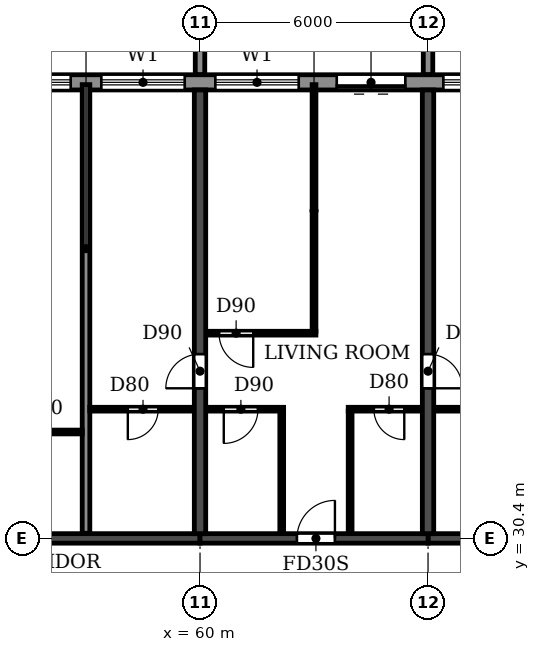
"""IFC4 building model, lengths in metres.
Left out: names, types, materials, properties, quantities, classifications, styles, units other than length and angle.
Written with IfcOpenShell. Run it as: python <this file> out.ifc"""

import sys

from ifc_helpers import new_model, si_unit, direction, frame, frame_2d, origin, place, context, subcontext, project, spatial, polyline, rectangle, outline, extrude, source, transform, mapped, element, fill, save


model = new_model("IFC4")
c1 = context("Model", 3, precision=1e-05, world=origin(), true_north=direction((0.0, 1.0)))
c2 = subcontext(c1, "Body", "Model", "MODEL_VIEW")
j1 = project(units=[si_unit("LENGTHUNIT", "METRE"), si_unit("PLANEANGLEUNIT", "RADIAN")], contexts=[c1])
p1 = place(None, origin())
s1 = spatial("IfcSite", under=j1, at=p1, CompositionType="ELEMENT")
p2 = place(p1, origin())
s2 = spatial("IfcBuilding", under=s1, at=p2, CompositionType="ELEMENT")
p3 = place(p2, frame((0.0, 0.0, 152.1)))
s3 = spatial("IfcBuildingStorey", under=s2, at=p3, CompositionType="ELEMENT", Elevation=152.1)
p4 = place(p3, frame((60.0, 30.525, 0.0), z_axis=(0.0, 0.0, 1.0), x_axis=(0.0, 1.0, 0.0)))
e1 = element("IfcWall", 1, at=p4, inside=s3, PredefinedType="SHEAR", context=c2, shape_type="SweptSolid", body=[
    extrude(rectangle(XDim=11.675, YDim=0.3, at=frame_2d((5.837, 0.0))), origin(), (0.0, 0.0, 1.0), 3.07),
])
p5 = place(p4, frame((3.825, 0.0, 0.0)))
e2 = element("IfcOpeningElement", 2, at=p5, cuts=e1, PredefinedType="OPENING", context=c2, shape_type="SweptSolid", body=[
    extrude(rectangle(XDim=0.9, YDim=2.1, at=frame_2d((0.45, 1.05))), frame((0.0, 0.16, 0.0), z_axis=(0.0, -1.0, 0.0), x_axis=(1.0, 0.0, 0.0)), (0.0, 0.0, 1.0), 0.32),
])
p6 = place(p3, frame((66.0, 30.525, 0.0), z_axis=(0.0, 0.0, 1.0), x_axis=(0.0, 1.0, 0.0)))
e3 = element("IfcWall", 3, at=p6, inside=s3, PredefinedType="SHEAR", context=c2, shape_type="SweptSolid", body=[
    extrude(rectangle(XDim=11.675, YDim=0.3, at=frame_2d((5.837, 0.0))), origin(), (0.0, 0.0, 1.0), 3.07),
])
p7 = place(p6, frame((3.825, 0.0, 0.0)))
e4 = element("IfcOpeningElement", 4, at=p7, cuts=e3, PredefinedType="OPENING", context=c2, shape_type="SweptSolid", body=[
    extrude(rectangle(XDim=0.9, YDim=2.1, at=frame_2d((0.45, 1.05))), frame((0.0, 0.16, 0.0), z_axis=(0.0, -1.0, 0.0), x_axis=(1.0, 0.0, 0.0)), (0.0, 0.0, 1.0), 0.32),
])
p8 = place(p3, frame((54.0, 30.4, 0.0), z_axis=(0.0, 0.0, 1.0), x_axis=(1.0, 0.0, 0.0)))
e5 = element("IfcWall", 5, at=p8, inside=s3, PredefinedType="SHEAR", context=c2, shape_type="SweptSolid", body=[
    extrude(rectangle(XDim=6.0, YDim=0.25, at=frame_2d((3.0, 0.0))), origin(), (0.0, 0.0, 1.0), 2.47),
])
p9 = place(p3, frame((60.0, 30.4, 0.0), z_axis=(0.0, 0.0, 1.0), x_axis=(1.0, 0.0, 0.0)))
e6 = element("IfcWall", 6, at=p9, inside=s3, PredefinedType="SHEAR", context=c2, shape_type="SweptSolid", body=[
    extrude(rectangle(XDim=6.0, YDim=0.25, at=frame_2d((3.0, 0.0))), origin(), (0.0, 0.0, 1.0), 2.47),
])
p10 = place(p9, frame((2.55, 0.0, 0.0)))
e7 = element("IfcOpeningElement", 7, at=p10, cuts=e6, PredefinedType="OPENING", context=c2, shape_type="SweptSolid", body=[
    extrude(rectangle(XDim=1.0, YDim=2.1, at=frame_2d((0.5, 1.05))), frame((0.0, 0.135, 0.0), z_axis=(0.0, -1.0, 0.0), x_axis=(1.0, 0.0, 0.0)), (0.0, 0.0, 1.0), 0.27),
])
p11 = place(p3, frame((66.0, 30.4, 0.0), z_axis=(0.0, 0.0, 1.0), x_axis=(1.0, 0.0, 0.0)))
e8 = element("IfcWall", 8, at=p11, inside=s3, PredefinedType="SHEAR", context=c2, shape_type="SweptSolid", body=[
    extrude(rectangle(XDim=6.0, YDim=0.25, at=frame_2d((3.0, 0.0))), origin(), (0.0, 0.0, 1.0), 2.47),
])
p12 = place(p3, frame((85.317, 42.4, 0.0), z_axis=(0.0, 0.0, 1.0), x_axis=(-1.0, 0.0, 0.0)))
e9 = element("IfcWall", 9, at=p12, inside=s3, PredefinedType="STANDARD", context=c2, shape_type="SweptSolid", body=[
    extrude(rectangle(XDim=68.634, YDim=0.4, at=frame_2d((34.317, 0.0))), origin(), (0.0, 0.0, 1.0), 3.07),
])
p13 = place(p12, frame((64.917, 0.0, 0.0)))
e10 = element("IfcOpeningElement", 10, at=p13, cuts=e9, PredefinedType="OPENING", context=c2, shape_type="SweptSolid", body=[
    extrude(rectangle(XDim=1.8, YDim=2.4, at=frame_2d((0.9, 1.2))), frame((0.0, 0.21, 0.0), z_axis=(0.0, -1.0, 0.0), x_axis=(1.0, 0.0, 0.0)), (0.0, 0.0, 1.0), 0.42),
])
p14 = place(p12, frame((61.717, 0.0, 0.9)))
e11 = element("IfcOpeningElement", 11, at=p14, cuts=e9, PredefinedType="OPENING", context=c2, shape_type="SweptSolid", body=[
    extrude(rectangle(XDim=2.2, YDim=1.5, at=frame_2d((1.1, 0.75))), frame((0.0, 0.21, 0.0), z_axis=(0.0, -1.0, 0.0), x_axis=(1.0, 0.0, 0.0)), (0.0, 0.0, 1.0), 0.42),
])
p15 = place(p12, frame((58.717, 0.0, 0.9)))
e12 = element("IfcOpeningElement", 12, at=p15, cuts=e9, PredefinedType="OPENING", context=c2, shape_type="SweptSolid", body=[
    extrude(rectangle(XDim=2.2, YDim=1.5, at=frame_2d((1.1, 0.75))), frame((0.0, 0.21, 0.0), z_axis=(0.0, -1.0, 0.0), x_axis=(1.0, 0.0, 0.0)), (0.0, 0.0, 1.0), 0.42),
])
p16 = place(p12, frame((55.917, 0.0, 0.0)))
e13 = element("IfcOpeningElement", 13, at=p16, cuts=e9, PredefinedType="OPENING", context=c2, shape_type="SweptSolid", body=[
    extrude(rectangle(XDim=1.8, YDim=2.4, at=frame_2d((0.9, 1.2))), frame((0.0, 0.21, 0.0), z_axis=(0.0, -1.0, 0.0), x_axis=(1.0, 0.0, 0.0)), (0.0, 0.0, 1.0), 0.42),
])
p17 = place(p12, frame((52.917, 0.0, 0.0)))
e14 = element("IfcOpeningElement", 14, at=p17, cuts=e9, PredefinedType="OPENING", context=c2, shape_type="SweptSolid", body=[
    extrude(rectangle(XDim=1.8, YDim=2.4, at=frame_2d((0.9, 1.2))), frame((0.0, 0.21, 0.0), z_axis=(0.0, -1.0, 0.0), x_axis=(1.0, 0.0, 0.0)), (0.0, 0.0, 1.0), 0.42),
])
p18 = place(p12, frame((49.717, 0.0, 0.9)))
e15 = element("IfcOpeningElement", 15, at=p18, cuts=e9, PredefinedType="OPENING", context=c2, shape_type="SweptSolid", body=[
    extrude(rectangle(XDim=2.2, YDim=1.5, at=frame_2d((1.1, 0.75))), frame((0.0, 0.21, 0.0), z_axis=(0.0, -1.0, 0.0), x_axis=(1.0, 0.0, 0.0)), (0.0, 0.0, 1.0), 0.42),
])
p19 = place(p12, frame((46.717, 0.0, 0.9)))
e16 = element("IfcOpeningElement", 16, at=p19, cuts=e9, PredefinedType="OPENING", context=c2, shape_type="SweptSolid", body=[
    extrude(rectangle(XDim=2.2, YDim=1.5, at=frame_2d((1.1, 0.75))), frame((0.0, 0.21, 0.0), z_axis=(0.0, -1.0, 0.0), x_axis=(1.0, 0.0, 0.0)), (0.0, 0.0, 1.0), 0.42),
])
p20 = place(p12, frame((43.717, 0.0, 0.9)))
e17 = element("IfcOpeningElement", 17, at=p20, cuts=e9, PredefinedType="OPENING", context=c2, shape_type="SweptSolid", body=[
    extrude(rectangle(XDim=2.2, YDim=1.5, at=frame_2d((1.1, 0.75))), frame((0.0, 0.21, 0.0), z_axis=(0.0, -1.0, 0.0), x_axis=(1.0, 0.0, 0.0)), (0.0, 0.0, 1.0), 0.42),
])
p21 = place(p12, frame((40.917, 0.0, 0.0)))
e18 = element("IfcOpeningElement", 18, at=p21, cuts=e9, PredefinedType="OPENING", context=c2, shape_type="SweptSolid", body=[
    extrude(rectangle(XDim=1.8, YDim=2.4, at=frame_2d((0.9, 1.2))), frame((0.0, 0.21, 0.0), z_axis=(0.0, -1.0, 0.0), x_axis=(1.0, 0.0, 0.0)), (0.0, 0.0, 1.0), 0.42),
])
p22 = place(p12, frame((37.717, 0.0, 0.9)))
e19 = element("IfcOpeningElement", 19, at=p22, cuts=e9, PredefinedType="OPENING", context=c2, shape_type="SweptSolid", body=[
    extrude(rectangle(XDim=2.2, YDim=1.5, at=frame_2d((1.1, 0.75))), frame((0.0, 0.21, 0.0), z_axis=(0.0, -1.0, 0.0), x_axis=(1.0, 0.0, 0.0)), (0.0, 0.0, 1.0), 0.42),
])
p23 = place(p12, frame((34.917, 0.0, 0.0)))
e20 = element("IfcOpeningElement", 20, at=p23, cuts=e9, PredefinedType="OPENING", context=c2, shape_type="SweptSolid", body=[
    extrude(rectangle(XDim=1.8, YDim=2.4, at=frame_2d((0.9, 1.2))), frame((0.0, 0.21, 0.0), z_axis=(0.0, -1.0, 0.0), x_axis=(1.0, 0.0, 0.0)), (0.0, 0.0, 1.0), 0.42),
])
p24 = place(p12, frame((31.717, 0.0, 0.9)))
e21 = element("IfcOpeningElement", 21, at=p24, cuts=e9, PredefinedType="OPENING", context=c2, shape_type="SweptSolid", body=[
    extrude(rectangle(XDim=2.2, YDim=1.5, at=frame_2d((1.1, 0.75))), frame((0.0, 0.21, 0.0), z_axis=(0.0, -1.0, 0.0), x_axis=(1.0, 0.0, 0.0)), (0.0, 0.0, 1.0), 0.42),
])
p25 = place(p12, frame((28.717, 0.0, 0.9)))
e22 = element("IfcOpeningElement", 22, at=p25, cuts=e9, PredefinedType="OPENING", context=c2, shape_type="SweptSolid", body=[
    extrude(rectangle(XDim=2.2, YDim=1.5, at=frame_2d((1.1, 0.75))), frame((0.0, 0.21, 0.0), z_axis=(0.0, -1.0, 0.0), x_axis=(1.0, 0.0, 0.0)), (0.0, 0.0, 1.0), 0.42),
])
p26 = place(p12, frame((25.717, 0.0, 0.9)))
e23 = element("IfcOpeningElement", 23, at=p26, cuts=e9, PredefinedType="OPENING", context=c2, shape_type="SweptSolid", body=[
    extrude(rectangle(XDim=2.2, YDim=1.5, at=frame_2d((1.1, 0.75))), frame((0.0, 0.21, 0.0), z_axis=(0.0, -1.0, 0.0), x_axis=(1.0, 0.0, 0.0)), (0.0, 0.0, 1.0), 0.42),
])
p27 = place(p12, frame((22.717, 0.0, 0.9)))
e24 = element("IfcOpeningElement", 24, at=p27, cuts=e9, PredefinedType="OPENING", context=c2, shape_type="SweptSolid", body=[
    extrude(rectangle(XDim=2.2, YDim=1.5, at=frame_2d((1.1, 0.75))), frame((0.0, 0.21, 0.0), z_axis=(0.0, -1.0, 0.0), x_axis=(1.0, 0.0, 0.0)), (0.0, 0.0, 1.0), 0.42),
])
p28 = place(p12, frame((19.917, 0.0, 0.0)))
e25 = element("IfcOpeningElement", 25, at=p28, cuts=e9, PredefinedType="OPENING", context=c2, shape_type="SweptSolid", body=[
    extrude(rectangle(XDim=1.8, YDim=2.4, at=frame_2d((0.9, 1.2))), frame((0.0, 0.21, 0.0), z_axis=(0.0, -1.0, 0.0), x_axis=(1.0, 0.0, 0.0)), (0.0, 0.0, 1.0), 0.42),
])
p29 = place(p12, frame((16.717, 0.0, 0.9)))
e26 = element("IfcOpeningElement", 26, at=p29, cuts=e9, PredefinedType="OPENING", context=c2, shape_type="SweptSolid", body=[
    extrude(rectangle(XDim=2.2, YDim=1.5, at=frame_2d((1.1, 0.75))), frame((0.0, 0.21, 0.0), z_axis=(0.0, -1.0, 0.0), x_axis=(1.0, 0.0, 0.0)), (0.0, 0.0, 1.0), 0.42),
])
p30 = place(p12, frame((13.717, 0.0, 0.9)))
e27 = element("IfcOpeningElement", 27, at=p30, cuts=e9, PredefinedType="OPENING", context=c2, shape_type="SweptSolid", body=[
    extrude(rectangle(XDim=2.2, YDim=1.5, at=frame_2d((1.1, 0.75))), frame((0.0, 0.21, 0.0), z_axis=(0.0, -1.0, 0.0), x_axis=(1.0, 0.0, 0.0)), (0.0, 0.0, 1.0), 0.42),
])
p31 = place(p12, frame((10.917, 0.0, 0.0)))
e28 = element("IfcOpeningElement", 28, at=p31, cuts=e9, PredefinedType="OPENING", context=c2, shape_type="SweptSolid", body=[
    extrude(rectangle(XDim=1.8, YDim=2.4, at=frame_2d((0.9, 1.2))), frame((0.0, 0.21, 0.0), z_axis=(0.0, -1.0, 0.0), x_axis=(1.0, 0.0, 0.0)), (0.0, 0.0, 1.0), 0.42),
])
p32 = place(p12, frame((7.717, 0.0, 0.9)))
e29 = element("IfcOpeningElement", 29, at=p32, cuts=e9, PredefinedType="OPENING", context=c2, shape_type="SweptSolid", body=[
    extrude(rectangle(XDim=2.2, YDim=1.5, at=frame_2d((1.1, 0.75))), frame((0.0, 0.21, 0.0), z_axis=(0.0, -1.0, 0.0), x_axis=(1.0, 0.0, 0.0)), (0.0, 0.0, 1.0), 0.42),
])
p33 = place(p12, frame((4.717, 0.0, 0.9)))
e30 = element("IfcOpeningElement", 30, at=p33, cuts=e9, PredefinedType="OPENING", context=c2, shape_type="SweptSolid", body=[
    extrude(rectangle(XDim=2.2, YDim=1.5, at=frame_2d((1.1, 0.75))), frame((0.0, 0.21, 0.0), z_axis=(0.0, -1.0, 0.0), x_axis=(1.0, 0.0, 0.0)), (0.0, 0.0, 1.0), 0.42),
])
p34 = place(p12, frame((1.917, 0.0, 0.0)))
e31 = element("IfcOpeningElement", 31, at=p34, cuts=e9, PredefinedType="OPENING", context=c2, shape_type="SweptSolid", body=[
    extrude(rectangle(XDim=1.8, YDim=2.4, at=frame_2d((0.9, 1.2))), frame((0.0, 0.21, 0.0), z_axis=(0.0, -1.0, 0.0), x_axis=(1.0, 0.0, 0.0)), (0.0, 0.0, 1.0), 0.42),
])
m1 = source(origin(), c2, "Body", "SweptSolid", [
    extrude(outline(polyline([(0.0, 0.0), (0.25, 0.0), (0.25, 3.1), (0.0, 3.1), (0.0, 0.0)])), origin(), (0.0, 0.0, 1.0), 3.1),
])
for number, where in (
    (32, (59.875, 42.6, 0.0)),
    (33, (65.875, 42.6, 0.0)),
):
    element("IfcWall", number, at=place(p3, frame(where)), inside=s3, PredefinedType="STANDARD", context=c2, shape_type="MappedRepresentation", body=[
        mapped(m1, transform((0.0, 0.0, 0.0))),
    ])
p35 = place(p3, frame((57.0, 30.535, 0.0), z_axis=(0.0, 0.0, 1.0), x_axis=(0.0, 1.0, 0.0)))
e34 = element("IfcWall", 34, at=p35, inside=s3, PredefinedType="PARTITIONING", context=c2, shape_type="SweptSolid", body=[
    extrude(rectangle(XDim=11.805, YDim=0.2, at=frame_2d((5.903, 0.0))), origin(), (0.0, 0.0, 1.0), 3.07),
])
p36 = place(p3, frame((54.16, 33.2, 0.0), z_axis=(0.0, 0.0, 1.0), x_axis=(1.0, 0.0, 0.0)))
e35 = element("IfcWall", 35, at=p36, inside=s3, PredefinedType="PARTITIONING", context=c2, shape_type="SweptSolid", body=[
    extrude(rectangle(XDim=2.74, YDim=0.1, at=frame_2d((1.37, 0.0))), origin(), (0.0, 0.0, 1.0), 3.07),
])
p37 = place(p36, frame((0.94, 0.0, 0.0)))
e36 = element("IfcOpeningElement", 36, at=p37, cuts=e35, PredefinedType="OPENING", context=c2, shape_type="SweptSolid", body=[
    extrude(rectangle(XDim=0.8, YDim=2.1, at=frame_2d((0.4, 1.05))), frame((0.0, 0.06, 0.0), z_axis=(0.0, -1.0, 0.0), x_axis=(1.0, 0.0, 0.0)), (0.0, 0.0, 1.0), 0.12),
])
p38 = place(p3, frame((57.1, 33.8, 0.0), z_axis=(0.0, 0.0, 1.0), x_axis=(1.0, 0.0, 0.0)))
e37 = element("IfcWall", 37, at=p38, inside=s3, PredefinedType="PARTITIONING", context=c2, shape_type="SweptSolid", body=[
    extrude(rectangle(XDim=2.74, YDim=0.1, at=frame_2d((1.37, 0.0))), origin(), (0.0, 0.0, 1.0), 3.07),
])
p39 = place(p38, frame((1.0, 0.0, 0.0)))
e38 = element("IfcOpeningElement", 38, at=p39, cuts=e37, PredefinedType="OPENING", context=c2, shape_type="SweptSolid", body=[
    extrude(rectangle(XDim=0.8, YDim=2.1, at=frame_2d((0.4, 1.05))), frame((0.0, 0.06, 0.0), z_axis=(0.0, -1.0, 0.0), x_axis=(1.0, 0.0, 0.0)), (0.0, 0.0, 1.0), 0.12),
])
p40 = place(p3, frame((60.16, 33.8, 0.0), z_axis=(0.0, 0.0, 1.0), x_axis=(1.0, 0.0, 0.0)))
e39 = element("IfcWall", 39, at=p40, inside=s3, PredefinedType="PARTITIONING", context=c2, shape_type="SweptSolid", body=[
    extrude(rectangle(XDim=2.04, YDim=0.1, at=frame_2d((1.02, 0.0))), origin(), (0.0, 0.0, 1.0), 3.07),
])
p41 = place(p40, frame((0.465, 0.0, 0.0)))
e40 = element("IfcOpeningElement", 40, at=p41, cuts=e39, PredefinedType="OPENING", context=c2, shape_type="SweptSolid", body=[
    extrude(rectangle(XDim=0.9, YDim=2.1, at=frame_2d((0.45, 1.05))), frame((0.0, 0.06, 0.0), z_axis=(0.0, -1.0, 0.0), x_axis=(1.0, 0.0, 0.0)), (0.0, 0.0, 1.0), 0.12),
])
p42 = place(p3, frame((63.9, 33.8, 0.0), z_axis=(0.0, 0.0, 1.0), x_axis=(1.0, 0.0, 0.0)))
e41 = element("IfcWall", 41, at=p42, inside=s3, PredefinedType="PARTITIONING", context=c2, shape_type="SweptSolid", body=[
    extrude(rectangle(XDim=1.94, YDim=0.1, at=frame_2d((0.97, 0.0))), origin(), (0.0, 0.0, 1.0), 3.07),
])
p43 = place(p42, frame((0.675, 0.0, 0.0)))
e42 = element("IfcOpeningElement", 42, at=p43, cuts=e41, PredefinedType="OPENING", context=c2, shape_type="SweptSolid", body=[
    extrude(rectangle(XDim=0.8, YDim=2.1, at=frame_2d((0.4, 1.05))), frame((0.0, 0.06, 0.0), z_axis=(0.0, -1.0, 0.0), x_axis=(1.0, 0.0, 0.0)), (0.0, 0.0, 1.0), 0.12),
])
p44 = place(p3, frame((66.16, 33.8, 0.0), z_axis=(0.0, 0.0, 1.0), x_axis=(1.0, 0.0, 0.0)))
e43 = element("IfcWall", 43, at=p44, inside=s3, PredefinedType="PARTITIONING", context=c2, shape_type="SweptSolid", body=[
    extrude(rectangle(XDim=2.94, YDim=0.1, at=frame_2d((1.47, 0.0))), origin(), (0.0, 0.0, 1.0), 3.07),
])
p45 = place(p44, frame((0.94, 0.0, 0.0)))
e44 = element("IfcOpeningElement", 44, at=p45, cuts=e43, PredefinedType="OPENING", context=c2, shape_type="SweptSolid", body=[
    extrude(rectangle(XDim=0.8, YDim=2.1, at=frame_2d((0.4, 1.05))), frame((0.0, 0.06, 0.0), z_axis=(0.0, -1.0, 0.0), x_axis=(1.0, 0.0, 0.0)), (0.0, 0.0, 1.0), 0.12),
])
p46 = place(p3, frame((60.16, 35.8, 0.0), z_axis=(0.0, 0.0, 1.0), x_axis=(1.0, 0.0, 0.0)))
e45 = element("IfcWall", 45, at=p46, inside=s3, PredefinedType="PARTITIONING", context=c2, shape_type="SweptSolid", body=[
    extrude(rectangle(XDim=2.89, YDim=0.1, at=frame_2d((1.445, 0.0))), origin(), (0.0, 0.0, 1.0), 3.07),
])
p47 = place(p46, frame((0.34, 0.0, 0.0)))
e46 = element("IfcOpeningElement", 46, at=p47, cuts=e45, PredefinedType="OPENING", context=c2, shape_type="SweptSolid", body=[
    extrude(rectangle(XDim=0.9, YDim=2.1, at=frame_2d((0.45, 1.05))), frame((0.0, 0.06, 0.0), z_axis=(0.0, -1.0, 0.0), x_axis=(1.0, 0.0, 0.0)), (0.0, 0.0, 1.0), 0.12),
])
p48 = place(p3, frame((62.15, 30.535, 0.0), z_axis=(0.0, 0.0, 1.0), x_axis=(0.0, 1.0, 0.0)))
e47 = element("IfcWall", 47, at=p48, inside=s3, PredefinedType="PARTITIONING", context=c2, shape_type="SweptSolid", body=[
    extrude(rectangle(XDim=3.215, YDim=0.1, at=frame_2d((1.607, 0.0))), origin(), (0.0, 0.0, 1.0), 3.07),
])
p49 = place(p3, frame((63.0, 35.85, 0.0), z_axis=(0.0, 0.0, 1.0), x_axis=(0.0, 1.0, 0.0)))
e48 = element("IfcWall", 48, at=p49, inside=s3, PredefinedType="PARTITIONING", context=c2, shape_type="SweptSolid", body=[
    extrude(rectangle(XDim=6.49, YDim=0.1, at=frame_2d((3.245, 0.0))), origin(), (0.0, 0.0, 1.0), 3.07),
])
p50 = place(p3, frame((63.95, 30.535, 0.0), z_axis=(0.0, 0.0, 1.0), x_axis=(0.0, 1.0, 0.0)))
e49 = element("IfcWall", 49, at=p50, inside=s3, PredefinedType="PARTITIONING", context=c2, shape_type="SweptSolid", body=[
    extrude(rectangle(XDim=3.215, YDim=0.1, at=frame_2d((1.607, 0.0))), origin(), (0.0, 0.0, 1.0), 3.07),
])
p51 = place(p25, origin())
e50 = element("IfcWindow", 50, at=p51, inside=s3, PartitioningType="DOUBLE_PANEL_HORIZONTAL", PredefinedType="WINDOW", context=c2, shape_type="SweptSolid", body=[
    extrude(rectangle(XDim=2.2, YDim=1.5, at=frame_2d((1.1, 0.75))), frame((0.0, 0.03, 0.0), z_axis=(0.0, -1.0, 0.0), x_axis=(1.0, 0.0, 0.0)), (0.0, 0.0, 1.0), 0.06),
])
fill(e22, e50)
p52 = place(p26, origin())
e51 = element("IfcWindow", 51, at=p52, inside=s3, PartitioningType="DOUBLE_PANEL_HORIZONTAL", PredefinedType="WINDOW", context=c2, shape_type="SweptSolid", body=[
    extrude(rectangle(XDim=2.2, YDim=1.5, at=frame_2d((1.1, 0.75))), frame((0.0, 0.03, 0.0), z_axis=(0.0, -1.0, 0.0), x_axis=(1.0, 0.0, 0.0)), (0.0, 0.0, 1.0), 0.06),
])
fill(e23, e51)
p53 = place(p27, origin())
e52 = element("IfcWindow", 52, at=p53, inside=s3, PartitioningType="DOUBLE_PANEL_HORIZONTAL", PredefinedType="WINDOW", context=c2, shape_type="SweptSolid", body=[
    extrude(rectangle(XDim=2.2, YDim=1.5, at=frame_2d((1.1, 0.75))), frame((0.0, 0.03, 0.0), z_axis=(0.0, -1.0, 0.0), x_axis=(1.0, 0.0, 0.0)), (0.0, 0.0, 1.0), 0.06),
])
fill(e24, e52)
p54 = place(p28, origin())
e53 = element("IfcDoor", 53, at=p54, inside=s3, OperationType="DOUBLE_DOOR_SLIDING", PredefinedType="DOOR", context=c2, shape_type="SweptSolid", body=[
    extrude(rectangle(XDim=1.8, YDim=2.4, at=frame_2d((0.9, 1.2))), frame((0.0, 0.025, 0.0), z_axis=(0.0, -1.0, 0.0), x_axis=(1.0, 0.0, 0.0)), (0.0, 0.0, 1.0), 0.05),
])
fill(e25, e53)
p55 = place(p29, origin())
e54 = element("IfcWindow", 54, at=p55, inside=s3, PartitioningType="DOUBLE_PANEL_HORIZONTAL", PredefinedType="WINDOW", context=c2, shape_type="SweptSolid", body=[
    extrude(rectangle(XDim=2.2, YDim=1.5, at=frame_2d((1.1, 0.75))), frame((0.0, 0.03, 0.0), z_axis=(0.0, -1.0, 0.0), x_axis=(1.0, 0.0, 0.0)), (0.0, 0.0, 1.0), 0.06),
])
fill(e26, e54)
p56 = place(p39, frame((0.8, 0.0, 0.0), z_axis=(0.0, 0.0, 1.0), x_axis=(-1.0, 0.0, 0.0)))
e55 = element("IfcDoor", 55, at=p56, inside=s3, OperationType="SINGLE_SWING_RIGHT", PredefinedType="DOOR", context=c2, shape_type="SweptSolid", body=[
    extrude(rectangle(XDim=0.8, YDim=2.1, at=frame_2d((0.4, 1.05))), frame((0.0, 0.025, 0.0), z_axis=(0.0, -1.0, 0.0), x_axis=(1.0, 0.0, 0.0)), (0.0, 0.0, 1.0), 0.05),
])
fill(e38, e55)
p57 = place(p5, origin())
e56 = element("IfcDoor", 56, at=p57, inside=s3, OperationType="SINGLE_SWING_LEFT", PredefinedType="DOOR", context=c2, shape_type="SweptSolid", body=[
    extrude(rectangle(XDim=0.9, YDim=2.1, at=frame_2d((0.45, 1.05))), frame((0.0, 0.025, 0.0), z_axis=(0.0, -1.0, 0.0), x_axis=(1.0, 0.0, 0.0)), (0.0, 0.0, 1.0), 0.05),
])
fill(e2, e56)
p58 = place(p47, frame((0.9, 0.0, 0.0), z_axis=(0.0, 0.0, 1.0), x_axis=(-1.0, 0.0, 0.0)))
e57 = element("IfcDoor", 57, at=p58, inside=s3, OperationType="SINGLE_SWING_LEFT", PredefinedType="DOOR", context=c2, shape_type="SweptSolid", body=[
    extrude(rectangle(XDim=0.9, YDim=2.1, at=frame_2d((0.45, 1.05))), frame((0.0, 0.025, 0.0), z_axis=(0.0, -1.0, 0.0), x_axis=(1.0, 0.0, 0.0)), (0.0, 0.0, 1.0), 0.05),
])
fill(e46, e57)
p59 = place(p41, frame((0.9, 0.0, 0.0), z_axis=(0.0, 0.0, 1.0), x_axis=(-1.0, 0.0, 0.0)))
e58 = element("IfcDoor", 58, at=p59, inside=s3, OperationType="SINGLE_SWING_RIGHT", PredefinedType="DOOR", context=c2, shape_type="SweptSolid", body=[
    extrude(rectangle(XDim=0.9, YDim=2.1, at=frame_2d((0.45, 1.05))), frame((0.0, 0.025, 0.0), z_axis=(0.0, -1.0, 0.0), x_axis=(1.0, 0.0, 0.0)), (0.0, 0.0, 1.0), 0.05),
])
fill(e40, e58)
p60 = place(p10, origin())
e59 = element("IfcDoor", 59, at=p60, inside=s3, OperationType="SINGLE_SWING_RIGHT", PredefinedType="DOOR", context=c2, shape_type="SweptSolid", body=[
    extrude(rectangle(XDim=1.0, YDim=2.1, at=frame_2d((0.5, 1.05))), frame((0.0, 0.025, 0.0), z_axis=(0.0, -1.0, 0.0), x_axis=(1.0, 0.0, 0.0)), (0.0, 0.0, 1.0), 0.05),
])
fill(e7, e59)
p61 = place(p43, frame((0.8, 0.0, 0.0), z_axis=(0.0, 0.0, 1.0), x_axis=(-1.0, 0.0, 0.0)))
e60 = element("IfcDoor", 60, at=p61, inside=s3, OperationType="SINGLE_SWING_LEFT", PredefinedType="DOOR", context=c2, shape_type="SweptSolid", body=[
    extrude(rectangle(XDim=0.8, YDim=2.1, at=frame_2d((0.4, 1.05))), frame((0.0, 0.025, 0.0), z_axis=(0.0, -1.0, 0.0), x_axis=(1.0, 0.0, 0.0)), (0.0, 0.0, 1.0), 0.05),
])
fill(e42, e60)
p62 = place(p7, frame((0.9, 0.0, 0.0), z_axis=(0.0, 0.0, 1.0), x_axis=(-1.0, 0.0, 0.0)))
e61 = element("IfcDoor", 61, at=p62, inside=s3, OperationType="SINGLE_SWING_RIGHT", PredefinedType="DOOR", context=c2, shape_type="SweptSolid", body=[
    extrude(rectangle(XDim=0.9, YDim=2.1, at=frame_2d((0.45, 1.05))), frame((0.0, 0.025, 0.0), z_axis=(0.0, -1.0, 0.0), x_axis=(1.0, 0.0, 0.0)), (0.0, 0.0, 1.0), 0.05),
])
fill(e4, e61)
save(model, sys.argv[1])
